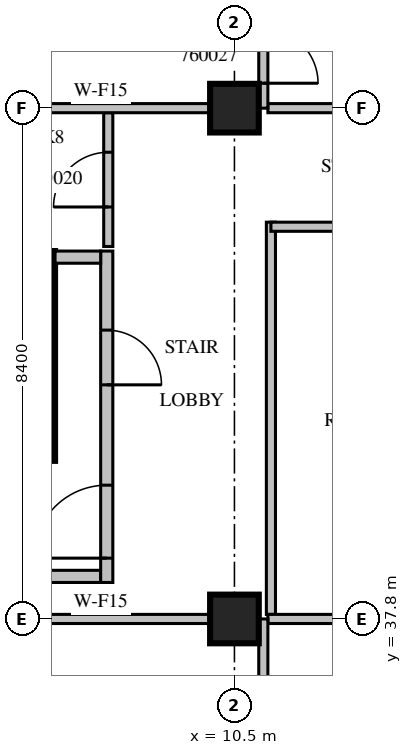
"""IFC4 building model, lengths in metres.
Left out: names, types, materials, properties, quantities, classifications, styles, units other than length and angle.
Written with IfcOpenShell. Run it as: python <this file> out.ifc"""

import sys

from ifc_helpers import new_model, si_unit, direction, frame, frame_2d, origin, origin_2d, place, context, subcontext, project, spatial, rectangle, extrude, source, transform, mapped, element, fill, save


model = new_model("IFC4")
c1 = context("Model", 3, precision=1e-05, world=origin(), true_north=direction((0.0, 1.0)))
c2 = subcontext(c1, "Body", "Model", "MODEL_VIEW")
j1 = project(units=[si_unit("LENGTHUNIT", "METRE"), si_unit("PLANEANGLEUNIT", "RADIAN")], contexts=[c1])
p1 = place(None, origin())
s1 = spatial("IfcSite", under=j1, at=p1, CompositionType="ELEMENT")
p2 = place(p1, origin())
s2 = spatial("IfcBuilding", under=s1, at=p2, CompositionType="ELEMENT")
p3 = place(p2, frame((0.0, 0.0, 261.4)))
s3 = spatial("IfcBuildingStorey", under=s2, at=p3, CompositionType="ELEMENT", Elevation=261.4)
m1 = source(origin(), c2, "Body", "SweptSolid", [
    extrude(rectangle(XDim=0.8, YDim=0.8, at=origin_2d()), origin(), (0.0, 0.0, 1.0), 3.8),
])
for number, where, z_axis, x_axis in (
    (1, (10.5, 37.8, 0.0), (0.0, 0.0, 1.0), (1.0, 0.0, 0.0)),
    (2, (10.5, 46.2, 0.0), (0.0, 0.0, 1.0), (1.0, 0.0, 0.0)),
):
    element("IfcColumn", number, at=place(p3, frame(where, z_axis=z_axis, x_axis=x_axis)), inside=s3, PredefinedType="COLUMN", context=c2, shape_type="MappedRepresentation", body=[
        mapped(m1, transform((0.0, 0.0, 0.0), scale=1.0)),
    ])
m2 = source(origin(), c2, "Body", "SweptSolid", [
    extrude(rectangle(XDim=3.45, YDim=0.25, at=frame_2d((1.725, 0.0))), origin(), (0.0, 0.0, 1.0), 3.4),
])
p4 = place(p3, frame((7.425, 40.4, 0.0), z_axis=(0.0, 0.0, 1.0), x_axis=(0.0, 1.0, 0.0)))
e3 = element("IfcWall", 3, at=p4, inside=s3, PredefinedType="SOLIDWALL", context=c2, shape_type="MappedRepresentation", body=[
    mapped(m2, transform((0.0, 0.0, 0.0), scale=1.0)),
])
m3 = source(origin(), c2, "Body", "SweptSolid", [
    extrude(rectangle(XDim=2.0, YDim=0.2, at=frame_2d((1.0, 0.0))), origin(), (0.0, 0.0, 1.0), 3.4),
])
p5 = place(p3, frame((6.3, 38.5, 0.0), z_axis=(0.0, 0.0, 1.0), x_axis=(1.0, 0.0, 0.0)))
e4 = element("IfcWall", 4, at=p5, inside=s3, PredefinedType="PARTITIONING", context=c2, shape_type="MappedRepresentation", body=[
    mapped(m3, transform((0.0, 0.0, 0.0), scale=1.0)),
])
m4 = source(origin(), c2, "Body", "SweptSolid", [
    extrude(rectangle(XDim=5.45, YDim=0.2, at=frame_2d((2.725, 0.0))), origin(), (0.0, 0.0, 1.0), 3.4),
])
p6 = place(p3, frame((8.4, 38.4, 0.0), z_axis=(0.0, 0.0, 1.0), x_axis=(0.0, 1.0, 0.0)))
e5 = element("IfcWall", 5, at=p6, inside=s3, PredefinedType="PARTITIONING", context=c2, shape_type="MappedRepresentation", body=[
    mapped(m4, transform((0.0, 0.0, 0.0), scale=1.0)),
])
m5 = source(origin(), c2, "Body", "SweptSolid", [
    extrude(rectangle(XDim=1.2, YDim=2.1, at=frame_2d((0.6, 1.05))), frame((0.0, 0.11, 0.0), z_axis=(0.0, -1.0, 0.0), x_axis=(1.0, 0.0, 0.0)), (0.0, 0.0, 1.0), 0.22),
])
p7 = place(p6, frame((0.4, 0.0, 0.0)))
e6 = element("IfcOpeningElement", 6, at=p7, cuts=e5, PredefinedType="OPENING", context=c2, shape_type="MappedRepresentation", body=[
    mapped(m5, transform((0.0, 0.0, 0.0), scale=1.0)),
])
m6 = source(origin(), c2, "Body", "SweptSolid", [
    extrude(rectangle(XDim=0.9, YDim=2.1, at=frame_2d((0.45, 1.05))), frame((0.0, 0.11, 0.0), z_axis=(0.0, -1.0, 0.0), x_axis=(1.0, 0.0, 0.0)), (0.0, 0.0, 1.0), 0.22),
])
p8 = place(p6, frame((3.25, 0.0, 0.0)))
e7 = element("IfcOpeningElement", 7, at=p8, cuts=e5, PredefinedType="OPENING", context=c2, shape_type="MappedRepresentation", body=[
    mapped(m6, transform((0.0, 0.0, 0.0), scale=1.0)),
])
m7 = source(origin(), c2, "Body", "SweptSolid", [
    extrude(rectangle(XDim=0.75, YDim=0.2, at=frame_2d((0.375, 0.0))), origin(), (0.0, 0.0, 1.0), 3.4),
])
p9 = place(p3, frame((7.55, 43.75, 0.0), z_axis=(0.0, 0.0, 1.0), x_axis=(1.0, 0.0, 0.0)))
e8 = element("IfcWall", 8, at=p9, inside=s3, PredefinedType="PARTITIONING", context=c2, shape_type="MappedRepresentation", body=[
    mapped(m7, transform((0.0, 0.0, 0.0), scale=1.0)),
])
m8 = source(origin(), c2, "Body", "SweptSolid", [
    extrude(rectangle(XDim=6.45, YDim=0.15, at=frame_2d((3.225, 0.0))), origin(), (0.0, 0.0, 1.0), 3.4),
])
p10 = place(p3, frame((11.1, 44.325, 0.0), z_axis=(0.0, 0.0, 1.0), x_axis=(0.0, -1.0, 0.0)))
e9 = element("IfcWall", 9, at=p10, inside=s3, PredefinedType="PARTITIONING", context=c2, shape_type="MappedRepresentation", body=[
    mapped(m8, transform((0.0, 0.0, 0.0), scale=1.0)),
])
m9 = source(origin(), c2, "Body", "SweptSolid", [
    extrude(rectangle(XDim=3.675, YDim=0.15, at=frame_2d((1.837, 0.0))), origin(), (0.0, 0.0, 1.0), 3.4),
])
p11 = place(p3, frame((14.775, 44.25, 0.0), z_axis=(0.0, 0.0, 1.0), x_axis=(-1.0, 0.0, 0.0)))
e10 = element("IfcWall", 10, at=p11, inside=s3, PredefinedType="PARTITIONING", context=c2, shape_type="MappedRepresentation", body=[
    mapped(m9, transform((0.0, 0.0, 0.0), scale=1.0)),
])
m10 = source(origin(), c2, "Body", "SweptSolid", [
    extrude(rectangle(XDim=2.2, YDim=0.15, at=frame_2d((1.1, 0.0))), origin(), (0.0, 0.0, 1.0), 3.4),
])
p12 = place(p3, frame((8.425, 43.925, 0.0), z_axis=(0.0, 0.0, 1.0), x_axis=(0.0, 1.0, 0.0)))
e11 = element("IfcWall", 11, at=p12, inside=s3, PredefinedType="PARTITIONING", context=c2, shape_type="MappedRepresentation", body=[
    mapped(m10, transform((0.0, 0.0, 0.0), scale=1.0)),
])
m11 = source(origin(), c2, "Body", "SweptSolid", [
    extrude(rectangle(XDim=0.9, YDim=2.1, at=frame_2d((0.45, 1.05))), frame((0.0, 0.085, 0.0), z_axis=(0.0, -1.0, 0.0), x_axis=(1.0, 0.0, 0.0)), (0.0, 0.0, 1.0), 0.17),
])
p13 = place(p12, frame((0.65, 0.0, 0.0)))
e12 = element("IfcOpeningElement", 12, at=p13, cuts=e11, PredefinedType="OPENING", context=c2, shape_type="MappedRepresentation", body=[
    mapped(m11, transform((0.0, 0.0, 0.0), scale=1.0)),
])
m12 = source(origin(), c2, "Body", "SweptSolid", [
    extrude(rectangle(XDim=3.596, YDim=0.15, at=frame_2d((1.798, 0.0))), origin(), (0.0, 0.0, 1.0), 3.4),
])
p14 = place(p3, frame((10.101, 37.8, 0.0), z_axis=(0.0, 0.0, 1.0), x_axis=(-1.0, 0.0, 0.0)))
e13 = element("IfcWall", 13, at=p14, inside=s3, PredefinedType="PARTITIONING", context=c2, shape_type="MappedRepresentation", body=[
    mapped(m12, transform((0.0, 0.0, 0.0), scale=1.0)),
])
m13 = source(origin(), c2, "Body", "SweptSolid", [
    extrude(rectangle(XDim=3.65, YDim=0.15, at=frame_2d((1.825, 0.0))), origin(), (0.0, 0.0, 1.0), 3.4),
])
p15 = place(p3, frame((14.7, 37.8, 0.0), z_axis=(0.0, 0.0, 1.0), x_axis=(-1.0, 0.0, 0.0)))
e14 = element("IfcWall", 14, at=p15, inside=s3, PredefinedType="PARTITIONING", context=c2, shape_type="MappedRepresentation", body=[
    mapped(m13, transform((0.0, 0.0, 0.0), scale=1.0)),
])
m14 = source(origin(), c2, "Body", "SweptSolid", [
    extrude(rectangle(XDim=8.4, YDim=0.15, at=frame_2d((4.2, 0.0))), origin(), (0.0, 0.0, 1.0), 3.4),
])
p16 = place(p3, frame((10.975, 29.4, 0.0), z_axis=(0.0, 0.0, 1.0), x_axis=(0.0, 1.0, 0.0)))
e15 = element("IfcWall", 15, at=p16, inside=s3, PredefinedType="PARTITIONING", context=c2, shape_type="MappedRepresentation", body=[
    mapped(m14, transform((0.0, 0.0, 0.0), scale=1.0)),
])
m15 = source(origin(), c2, "Body", "SweptSolid", [
    extrude(rectangle(XDim=1.1, YDim=2.1, at=frame_2d((0.55, 1.05))), frame((0.0, 0.085, 0.0), z_axis=(0.0, -1.0, 0.0), x_axis=(1.0, 0.0, 0.0)), (0.0, 0.0, 1.0), 0.17),
])
p17 = place(p16, frame((0.851, 0.0, 0.0)))
e16 = element("IfcOpeningElement", 16, at=p17, cuts=e15, PredefinedType="OPENING", context=c2, shape_type="MappedRepresentation", body=[
    mapped(m15, transform((0.0, 0.0, 0.0), scale=1.0)),
])
p18 = place(p16, frame((3.38, 0.0, 0.0)))
e17 = element("IfcOpeningElement", 17, at=p18, cuts=e15, PredefinedType="OPENING", context=c2, shape_type="MappedRepresentation", body=[
    mapped(m11, transform((0.0, 0.0, 0.0), scale=1.0)),
])
p19 = place(p16, frame((6.179, 0.0, 0.0)))
e18 = element("IfcOpeningElement", 18, at=p19, cuts=e15, PredefinedType="OPENING", context=c2, shape_type="MappedRepresentation", body=[
    mapped(m11, transform((0.0, 0.0, 0.0), scale=1.0)),
])
p20 = place(p3, frame((10.101, 46.2, 0.0), z_axis=(0.0, 0.0, 1.0), x_axis=(-1.0, 0.0, 0.0)))
e19 = element("IfcWall", 19, at=p20, inside=s3, PredefinedType="PARTITIONING", context=c2, shape_type="MappedRepresentation", body=[
    mapped(m12, transform((0.0, 0.0, 0.0), scale=1.0)),
])
p21 = place(p3, frame((14.7, 46.2, 0.0), z_axis=(0.0, 0.0, 1.0), x_axis=(-1.0, 0.0, 0.0)))
e20 = element("IfcWall", 20, at=p21, inside=s3, PredefinedType="PARTITIONING", context=c2, shape_type="MappedRepresentation", body=[
    mapped(m13, transform((0.0, 0.0, 0.0), scale=1.0)),
])
m16 = source(origin(), c2, "Body", "SweptSolid", [
    extrude(rectangle(XDim=7.26, YDim=0.15, at=frame_2d((3.63, 0.0))), origin(), (0.0, 0.0, 1.0), 3.4),
])
p22 = place(p3, frame((10.975, 46.2, 0.0), z_axis=(0.0, 0.0, 1.0), x_axis=(0.0, 1.0, 0.0)))
e21 = element("IfcWall", 21, at=p22, inside=s3, PredefinedType="PARTITIONING", context=c2, shape_type="MappedRepresentation", body=[
    mapped(m16, transform((0.0, 0.0, 0.0), scale=1.0)),
])
p23 = place(p22, frame((1.361, 0.0, 0.0)))
e22 = element("IfcOpeningElement", 22, at=p23, cuts=e21, PredefinedType="OPENING", context=c2, shape_type="MappedRepresentation", body=[
    mapped(m11, transform((0.0, 0.0, 0.0), scale=1.0)),
])
p24 = place(p22, frame((0.41, 0.0, 0.0)))
e23 = element("IfcOpeningElement", 23, at=p24, cuts=e21, PredefinedType="OPENING", context=c2, shape_type="MappedRepresentation", body=[
    mapped(m11, transform((0.0, 0.0, 0.0), scale=1.0)),
])
p25 = place(p22, frame((4.096, 0.0, 0.0)))
e24 = element("IfcOpeningElement", 24, at=p25, cuts=e21, PredefinedType="OPENING", context=c2, shape_type="MappedRepresentation", body=[
    mapped(m11, transform((0.0, 0.0, 0.0), scale=1.0)),
])
m17 = source(origin(), c2, "Body", "SweptSolid", [
    extrude(rectangle(XDim=1.2, YDim=2.1, at=frame_2d((0.6, 1.05))), frame((0.0, 0.025, 0.0), z_axis=(0.0, -1.0, 0.0), x_axis=(1.0, 0.0, 0.0)), (0.0, 0.0, 1.0), 0.05),
])
p26 = place(p7, origin())
e25 = element("IfcDoor", 25, at=p26, inside=s3, OperationType="SINGLE_SWING_LEFT", PredefinedType="DOOR", context=c2, shape_type="MappedRepresentation", body=[
    mapped(m17, transform((0.0, 0.0, 0.0), scale=1.0)),
])
fill(e6, e25)
m18 = source(origin(), c2, "Body", "SweptSolid", [
    extrude(rectangle(XDim=0.9, YDim=2.1, at=frame_2d((0.45, 1.05))), frame((0.0, 0.025, 0.0), z_axis=(0.0, -1.0, 0.0), x_axis=(1.0, 0.0, 0.0)), (0.0, 0.0, 1.0), 0.05),
])
p27 = place(p8, origin())
e26 = element("IfcDoor", 26, at=p27, inside=s3, OperationType="SINGLE_SWING_RIGHT", PredefinedType="DOOR", context=c2, shape_type="MappedRepresentation", body=[
    mapped(m18, transform((0.0, 0.0, 0.0), scale=1.0)),
])
fill(e7, e26)
p28 = place(p13, origin())
e27 = element("IfcDoor", 27, at=p28, inside=s3, OperationType="SINGLE_SWING_LEFT", PredefinedType="DOOR", context=c2, shape_type="MappedRepresentation", body=[
    mapped(m18, transform((0.0, 0.0, 0.0), scale=1.0)),
])
fill(e12, e27)
p29 = place(p24, origin())
e28 = element("IfcDoor", 28, at=p29, inside=s3, OperationType="SINGLE_SWING_RIGHT", PredefinedType="DOOR", context=c2, shape_type="MappedRepresentation", body=[
    mapped(m18, transform((0.0, 0.0, 0.0), scale=1.0)),
])
fill(e23, e28)
save(model, sys.argv[1])
